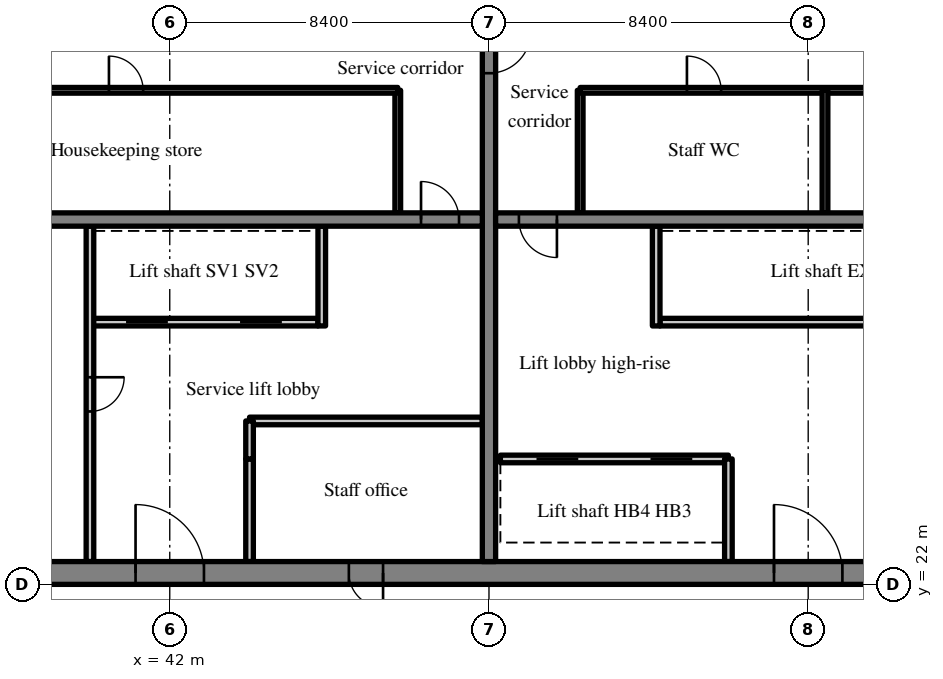
"""IFC4 building model, lengths in metres.
Left out: names, types, materials, properties, quantities, classifications, styles, units other than length and angle.
Written with IfcOpenShell. Run it as: python <this file> out.ifc"""

import sys

from ifc_helpers import new_model, si_unit, direction, frame, frame_2d, origin, place, context, subcontext, project, spatial, rectangle, extrude, source, transform, mapped, element, fill, save


model = new_model("IFC4")
c1 = context("Model", 3, precision=1e-05, world=origin(), true_north=direction((0.0, 1.0)))
c2 = subcontext(c1, "Body", "Model", "MODEL_VIEW")
j1 = project(units=[si_unit("LENGTHUNIT", "METRE"), si_unit("PLANEANGLEUNIT", "RADIAN")], contexts=[c1])
p1 = place(None, origin())
s1 = spatial("IfcSite", under=j1, at=p1, CompositionType="ELEMENT")
p2 = place(p1, origin())
s2 = spatial("IfcBuilding", under=s1, at=p2, CompositionType="ELEMENT")
p3 = place(p2, frame((0.0, 0.0, 249.1)))
s3 = spatial("IfcBuildingStorey", under=s2, at=p3, CompositionType="ELEMENT", Elevation=249.1)
m1 = source(origin(), c2, "Body", "SweptSolid", [
    extrude(rectangle(XDim=50.4, YDim=0.6, at=frame_2d((25.2, 0.0))), origin(), (0.0, 0.0, 1.0), 3.62),
])
p4 = place(p3, frame((25.2, 22.3, 0.0), z_axis=(0.0, 0.0, 1.0), x_axis=(1.0, 0.0, 0.0)))
e1 = element("IfcWall", 1, at=p4, inside=s3, PredefinedType="SHEAR", context=c2, shape_type="MappedRepresentation", body=[
    mapped(m1, transform((0.0, 0.0, 0.0), scale=1.0)),
])
m2 = source(origin(), c2, "Body", "SweptSolid", [
    extrude(rectangle(XDim=1.8, YDim=2.1, at=frame_2d((0.9, 1.05))), frame((0.0, 0.31, 0.0), z_axis=(0.0, -1.0, 0.0), x_axis=(1.0, 0.0, 0.0)), (0.0, 0.0, 1.0), 0.62),
])
p5 = place(p4, frame((15.9, 0.0, 0.0)))
e2 = element("IfcOpeningElement", 2, at=p5, cuts=e1, PredefinedType="OPENING", context=c2, shape_type="MappedRepresentation", body=[
    mapped(m2, transform((0.0, 0.0, 0.0), scale=1.0)),
])
m3 = source(origin(), c2, "Body", "SweptSolid", [
    extrude(rectangle(XDim=0.9, YDim=2.1, at=frame_2d((0.45, 1.05))), frame((0.0, 0.31, 0.0), z_axis=(0.0, -1.0, 0.0), x_axis=(1.0, 0.0, 0.0)), (0.0, 0.0, 1.0), 0.62),
])
p6 = place(p4, frame((21.513, 0.0, 0.0)))
e3 = element("IfcOpeningElement", 3, at=p6, cuts=e1, PredefinedType="OPENING", context=c2, shape_type="MappedRepresentation", body=[
    mapped(m3, transform((0.0, 0.0, 0.0), scale=1.0)),
])
p7 = place(p4, frame((32.7, 0.0, 0.0)))
e4 = element("IfcOpeningElement", 4, at=p7, cuts=e1, PredefinedType="OPENING", context=c2, shape_type="MappedRepresentation", body=[
    mapped(m2, transform((0.0, 0.0, 0.0), scale=1.0)),
])
m4 = source(origin(), c2, "Body", "SweptSolid", [
    extrude(rectangle(XDim=1.2, YDim=2.1, at=frame_2d((0.6, 1.05))), frame((0.0, 0.31, 0.0), z_axis=(0.0, -1.0, 0.0), x_axis=(1.0, 0.0, 0.0)), (0.0, 0.0, 1.0), 0.62),
])
p8 = place(p4, frame((6.488, 0.0, 0.0)))
e5 = element("IfcOpeningElement", 5, at=p8, cuts=e1, PredefinedType="OPENING", context=c2, shape_type="MappedRepresentation", body=[
    mapped(m4, transform((0.0, 0.0, 0.0), scale=1.0)),
])
p9 = place(p4, frame((47.925, 0.0, 0.0)))
e6 = element("IfcOpeningElement", 6, at=p9, cuts=e1, PredefinedType="OPENING", context=c2, shape_type="MappedRepresentation", body=[
    mapped(m4, transform((0.0, 0.0, 0.0), scale=1.0)),
])
m5 = source(origin(), c2, "Body", "SweptSolid", [
    extrude(rectangle(XDim=18.8, YDim=0.35, at=frame_2d((9.4, 0.0))), origin(), (0.0, 0.0, 1.0), 3.62),
])
p10 = place(p3, frame((50.4, 22.6, 0.0), z_axis=(0.0, 0.0, 1.0), x_axis=(0.0, 1.0, 0.0)))
e7 = element("IfcWall", 7, at=p10, inside=s3, PredefinedType="SHEAR", context=c2, shape_type="MappedRepresentation", body=[
    mapped(m5, transform((0.0, 0.0, 0.0), scale=1.0)),
])
m6 = source(origin(), c2, "Body", "SweptSolid", [
    extrude(rectangle(XDim=1.1, YDim=2.1, at=frame_2d((0.55, 1.05))), frame((0.0, 0.185, 0.0), z_axis=(0.0, -1.0, 0.0), x_axis=(1.0, 0.0, 0.0)), (0.0, 0.0, 1.0), 0.37),
])
p11 = place(p10, frame((12.85, 0.0, 0.0)))
e8 = element("IfcOpeningElement", 8, at=p11, cuts=e7, PredefinedType="OPENING", context=c2, shape_type="MappedRepresentation", body=[
    mapped(m6, transform((0.0, 0.0, 0.0), scale=1.0)),
])
m7 = source(origin(), c2, "Body", "SweptSolid", [
    extrude(rectangle(XDim=16.45, YDim=0.35, at=frame_2d((8.225, 0.0))), origin(), (0.0, 0.0, 1.0), 3.62),
])
p12 = place(p3, frame((33.775, 31.6, 0.0), z_axis=(0.0, 0.0, 1.0), x_axis=(1.0, 0.0, 0.0)))
e9 = element("IfcWall", 9, at=p12, inside=s3, PredefinedType="SHEAR", context=c2, shape_type="MappedRepresentation", body=[
    mapped(m7, transform((0.0, 0.0, 0.0), scale=1.0)),
])
m8 = source(origin(), c2, "Body", "SweptSolid", [
    extrude(rectangle(XDim=1.0, YDim=2.1, at=frame_2d((0.5, 1.05))), frame((0.0, 0.185, 0.0), z_axis=(0.0, -1.0, 0.0), x_axis=(1.0, 0.0, 0.0)), (0.0, 0.0, 1.0), 0.37),
])
p13 = place(p12, frame((14.837, 0.0, 0.0)))
e10 = element("IfcOpeningElement", 10, at=p13, cuts=e9, PredefinedType="OPENING", context=c2, shape_type="MappedRepresentation", body=[
    mapped(m8, transform((0.0, 0.0, 0.0), scale=1.0)),
])
m9 = source(origin(), c2, "Body", "SweptSolid", [
    extrude(rectangle(XDim=16.45, YDim=0.35, at=frame_2d((8.225, 0.0))), origin(), (0.0, 0.0, 1.0), 3.62),
])
p14 = place(p3, frame((50.575, 31.6, 0.0), z_axis=(0.0, 0.0, 1.0), x_axis=(1.0, 0.0, 0.0)))
e11 = element("IfcWall", 11, at=p14, inside=s3, PredefinedType="SHEAR", context=c2, shape_type="MappedRepresentation", body=[
    mapped(m9, transform((0.0, 0.0, 0.0), scale=1.0)),
])
p15 = place(p14, frame((0.613, 0.0, 0.0)))
e12 = element("IfcOpeningElement", 12, at=p15, cuts=e11, PredefinedType="OPENING", context=c2, shape_type="MappedRepresentation", body=[
    mapped(m8, transform((0.0, 0.0, 0.0), scale=1.0)),
])
m10 = source(origin(), c2, "Body", "SweptSolid", [
    extrude(rectangle(XDim=6.0, YDim=0.2, at=frame_2d((3.0, 0.0))), origin(), (0.0, 0.0, 1.0), 3.62),
])
p16 = place(p3, frame((39.9, 28.9, 0.0), z_axis=(0.0, 0.0, 1.0), x_axis=(1.0, 0.0, 0.0)))
e13 = element("IfcWall", 13, at=p16, inside=s3, PredefinedType="SOLIDWALL", context=c2, shape_type="MappedRepresentation", body=[
    mapped(m10, transform((0.0, 0.0, 0.0), scale=1.0)),
])
m11 = source(origin(), c2, "Body", "SweptSolid", [
    extrude(rectangle(XDim=1.1, YDim=2.1, at=frame_2d((0.55, 1.05))), frame((0.0, 0.11, 0.0), z_axis=(0.0, -1.0, 0.0), x_axis=(1.0, 0.0, 0.0)), (0.0, 0.0, 1.0), 0.22),
])
p17 = place(p16, frame((0.95, 0.0, 0.0)))
e14 = element("IfcOpeningElement", 14, at=p17, cuts=e13, PredefinedType="OPENING", context=c2, shape_type="MappedRepresentation", body=[
    mapped(m11, transform((0.0, 0.0, 0.0), scale=1.0)),
])
p18 = place(p16, frame((3.95, 0.0, 0.0)))
e15 = element("IfcOpeningElement", 15, at=p18, cuts=e13, PredefinedType="OPENING", context=c2, shape_type="MappedRepresentation", body=[
    mapped(m11, transform((0.0, 0.0, 0.0), scale=1.0)),
])
m12 = source(origin(), c2, "Body", "SweptSolid", [
    extrude(rectangle(XDim=8.825, YDim=0.2, at=frame_2d((4.413, 0.0))), origin(), (0.0, 0.0, 1.0), 3.62),
])
p19 = place(p3, frame((39.9, 22.6, 0.0), z_axis=(0.0, 0.0, 1.0), x_axis=(0.0, 1.0, 0.0)))
e16 = element("IfcWall", 16, at=p19, inside=s3, PredefinedType="PARTITIONING", context=c2, shape_type="MappedRepresentation", body=[
    mapped(m12, transform((0.0, 0.0, 0.0), scale=1.0)),
])
m13 = source(origin(), c2, "Body", "SweptSolid", [
    extrude(rectangle(XDim=0.9, YDim=2.1, at=frame_2d((0.45, 1.05))), frame((0.0, 0.11, 0.0), z_axis=(0.0, -1.0, 0.0), x_axis=(1.0, 0.0, 0.0)), (0.0, 0.0, 1.0), 0.22),
])
p20 = place(p19, frame((3.95, 0.0, 0.0)))
e17 = element("IfcOpeningElement", 17, at=p20, cuts=e16, PredefinedType="OPENING", context=c2, shape_type="MappedRepresentation", body=[
    mapped(m13, transform((0.0, 0.0, 0.0), scale=1.0)),
])
m14 = source(origin(), c2, "Body", "SweptSolid", [
    extrude(rectangle(XDim=2.7, YDim=0.2, at=frame_2d((1.35, 0.0))), origin(), (0.0, 0.0, 1.0), 3.62),
])
p21 = place(p3, frame((44.1, 22.6, 0.0), z_axis=(0.0, 0.0, 1.0), x_axis=(0.0, 1.0, 0.0)))
e18 = element("IfcWall", 18, at=p21, inside=s3, PredefinedType="PARTITIONING", context=c2, shape_type="MappedRepresentation", body=[
    mapped(m14, transform((0.0, 0.0, 0.0), scale=1.0)),
])
m15 = source(origin(), c2, "Body", "SweptSolid", [
    extrude(rectangle(XDim=2.625, YDim=0.2, at=frame_2d((1.312, 0.0))), origin(), (0.0, 0.0, 1.0), 3.62),
])
p22 = place(p3, frame((46.0, 28.8, 0.0), z_axis=(0.0, 0.0, 1.0), x_axis=(0.0, 1.0, 0.0)))
e19 = element("IfcWall", 19, at=p22, inside=s3, PredefinedType="SOLIDWALL", context=c2, shape_type="MappedRepresentation", body=[
    mapped(m15, transform((0.0, 0.0, 0.0), scale=1.0)),
])
m16 = source(origin(), c2, "Body", "SweptSolid", [
    extrude(rectangle(XDim=6.125, YDim=0.2, at=frame_2d((3.062, 0.0))), origin(), (0.0, 0.0, 1.0), 3.62),
])
p23 = place(p3, frame((44.1, 26.3, 0.0), z_axis=(0.0, 0.0, 1.0), x_axis=(1.0, 0.0, 0.0)))
e20 = element("IfcWall", 20, at=p23, inside=s3, PredefinedType="PARTITIONING", context=c2, shape_type="MappedRepresentation", body=[
    mapped(m16, transform((0.0, 0.0, 0.0), scale=1.0)),
])
m17 = source(origin(), c2, "Body", "SweptSolid", [
    extrude(rectangle(XDim=1.0, YDim=0.2, at=frame_2d((0.5, 0.0))), origin(), (0.0, 0.0, 1.0), 3.62),
])
p24 = place(p3, frame((44.1, 25.3, 0.0), z_axis=(0.0, 0.0, 1.0), x_axis=(0.0, 1.0, 0.0)))
e21 = element("IfcWall", 21, at=p24, inside=s3, PredefinedType="PARTITIONING", context=c2, shape_type="MappedRepresentation", body=[
    mapped(m17, transform((0.0, 0.0, 0.0), scale=1.0)),
])
m18 = source(origin(), c2, "Body", "SweptSolid", [
    extrude(rectangle(XDim=3.225, YDim=0.15, at=frame_2d((1.613, 0.0))), origin(), (0.0, 0.0, 1.0), 3.62),
])
p25 = place(p3, frame((48.0, 31.775, 0.0), z_axis=(0.0, 0.0, 1.0), x_axis=(0.0, 1.0, 0.0)))
e22 = element("IfcWall", 22, at=p25, inside=s3, PredefinedType="PARTITIONING", context=c2, shape_type="MappedRepresentation", body=[
    mapped(m18, transform((0.0, 0.0, 0.0), scale=1.0)),
])
m19 = source(origin(), c2, "Body", "SweptSolid", [
    extrude(rectangle(XDim=14.225, YDim=0.15, at=frame_2d((7.113, 0.0))), origin(), (0.0, 0.0, 1.0), 3.62),
])
p26 = place(p3, frame((33.775, 35.0, 0.0), z_axis=(0.0, 0.0, 1.0), x_axis=(1.0, 0.0, 0.0)))
e23 = element("IfcWall", 23, at=p26, inside=s3, PredefinedType="PARTITIONING", context=c2, shape_type="MappedRepresentation", body=[
    mapped(m19, transform((0.0, 0.0, 0.0), scale=1.0)),
])
m20 = source(origin(), c2, "Body", "SweptSolid", [
    extrude(rectangle(XDim=0.9, YDim=2.1, at=frame_2d((0.45, 1.05))), frame((0.0, 0.085, 0.0), z_axis=(0.0, -1.0, 0.0), x_axis=(1.0, 0.0, 0.0)), (0.0, 0.0, 1.0), 0.17),
])
p27 = place(p26, frame((6.625, 0.0, 0.0)))
e24 = element("IfcOpeningElement", 24, at=p27, cuts=e23, PredefinedType="OPENING", context=c2, shape_type="MappedRepresentation", body=[
    mapped(m20, transform((0.0, 0.0, 0.0), scale=1.0)),
])
p28 = place(p3, frame((56.7, 25.3, 0.0), z_axis=(0.0, 0.0, 1.0), x_axis=(-1.0, 0.0, 0.0)))
e25 = element("IfcWall", 25, at=p28, inside=s3, PredefinedType="SOLIDWALL", context=c2, shape_type="MappedRepresentation", body=[
    mapped(m10, transform((0.0, 0.0, 0.0), scale=1.0)),
])
p29 = place(p28, frame((0.95, 0.0, 0.0)))
e26 = element("IfcOpeningElement", 26, at=p29, cuts=e25, PredefinedType="OPENING", context=c2, shape_type="MappedRepresentation", body=[
    mapped(m11, transform((0.0, 0.0, 0.0), scale=1.0)),
])
p30 = place(p28, frame((3.95, 0.0, 0.0)))
e27 = element("IfcOpeningElement", 27, at=p30, cuts=e25, PredefinedType="OPENING", context=c2, shape_type="MappedRepresentation", body=[
    mapped(m11, transform((0.0, 0.0, 0.0), scale=1.0)),
])
m21 = source(origin(), c2, "Body", "SweptSolid", [
    extrude(rectangle(XDim=12.125, YDim=0.2, at=frame_2d((6.062, 0.0))), origin(), (0.0, 0.0, 1.0), 3.62),
])
p31 = place(p3, frame((67.025, 28.9, 0.0), z_axis=(0.0, 0.0, 1.0), x_axis=(-1.0, 0.0, 0.0)))
e28 = element("IfcWall", 28, at=p31, inside=s3, PredefinedType="SOLIDWALL", context=c2, shape_type="MappedRepresentation", body=[
    mapped(m21, transform((0.0, 0.0, 0.0), scale=1.0)),
])
p32 = place(p31, frame((1.075, 0.0, 0.0)))
e29 = element("IfcOpeningElement", 29, at=p32, cuts=e28, PredefinedType="OPENING", context=c2, shape_type="MappedRepresentation", body=[
    mapped(m11, transform((0.0, 0.0, 0.0), scale=1.0)),
])
p33 = place(p31, frame((4.075, 0.0, 0.0)))
e30 = element("IfcOpeningElement", 30, at=p33, cuts=e28, PredefinedType="OPENING", context=c2, shape_type="MappedRepresentation", body=[
    mapped(m11, transform((0.0, 0.0, 0.0), scale=1.0)),
])
p34 = place(p3, frame((56.7, 22.6, 0.0), z_axis=(0.0, 0.0, 1.0), x_axis=(0.0, 1.0, 0.0)))
e31 = element("IfcWall", 31, at=p34, inside=s3, PredefinedType="SOLIDWALL", context=c2, shape_type="MappedRepresentation", body=[
    mapped(m14, transform((0.0, 0.0, 0.0), scale=1.0)),
])
p35 = place(p3, frame((54.8, 28.8, 0.0), z_axis=(0.0, 0.0, 1.0), x_axis=(0.0, 1.0, 0.0)))
e32 = element("IfcWall", 32, at=p35, inside=s3, PredefinedType="SOLIDWALL", context=c2, shape_type="MappedRepresentation", body=[
    mapped(m15, transform((0.0, 0.0, 0.0), scale=1.0)),
])
p36 = place(p3, frame((52.8, 31.775, 0.0), z_axis=(0.0, 0.0, 1.0), x_axis=(0.0, 1.0, 0.0)))
e33 = element("IfcWall", 33, at=p36, inside=s3, PredefinedType="PARTITIONING", context=c2, shape_type="MappedRepresentation", body=[
    mapped(m18, transform((0.0, 0.0, 0.0), scale=1.0)),
])
m22 = source(origin(), c2, "Body", "SweptSolid", [
    extrude(rectangle(XDim=14.225, YDim=0.15, at=frame_2d((7.112, 0.0))), origin(), (0.0, 0.0, 1.0), 3.62),
])
p37 = place(p3, frame((67.025, 35.0, 0.0), z_axis=(0.0, 0.0, 1.0), x_axis=(-1.0, 0.0, 0.0)))
e34 = element("IfcWall", 34, at=p37, inside=s3, PredefinedType="PARTITIONING", context=c2, shape_type="MappedRepresentation", body=[
    mapped(m22, transform((0.0, 0.0, 0.0), scale=1.0)),
])
p38 = place(p37, frame((3.441, 0.0, 0.0)))
e35 = element("IfcOpeningElement", 35, at=p38, cuts=e34, PredefinedType="OPENING", context=c2, shape_type="MappedRepresentation", body=[
    mapped(m20, transform((0.0, 0.0, 0.0), scale=1.0)),
])
p39 = place(p37, frame((10.516, 0.0, 0.0)))
e36 = element("IfcOpeningElement", 36, at=p39, cuts=e34, PredefinedType="OPENING", context=c2, shape_type="MappedRepresentation", body=[
    mapped(m20, transform((0.0, 0.0, 0.0), scale=1.0)),
])
p40 = place(p3, frame((59.242, 31.775, 0.0), z_axis=(0.0, 0.0, 1.0), x_axis=(0.0, 1.0, 0.0)))
e37 = element("IfcWall", 37, at=p40, inside=s3, PredefinedType="PARTITIONING", context=c2, shape_type="MappedRepresentation", body=[
    mapped(m18, transform((0.0, 0.0, 0.0), scale=1.0)),
])
m23 = source(origin(), c2, "Body", "SweptSolid", [
    extrude(rectangle(XDim=1.8, YDim=2.1, at=frame_2d((0.9, 1.05))), frame((0.0, 0.225, 0.0), z_axis=(0.0, -1.0, 0.0), x_axis=(1.0, 0.0, 0.0)), (0.0, 0.0, 1.0), 0.05),
])
p41 = place(p5, origin())
e38 = element("IfcDoor", 38, at=p41, inside=s3, OperationType="DOUBLE_DOOR_SINGLE_SWING", PredefinedType="DOOR", context=c2, shape_type="MappedRepresentation", body=[
    mapped(m23, transform((0.0, 0.0, 0.0), scale=1.0)),
])
fill(e2, e38)
m24 = source(origin(), c2, "Body", "SweptSolid", [
    extrude(rectangle(XDim=1.0, YDim=2.1, at=frame_2d((0.5, 1.05))), frame((0.0, 0.025, 0.0), z_axis=(0.0, -1.0, 0.0), x_axis=(1.0, 0.0, 0.0)), (0.0, 0.0, 1.0), 0.05),
])
p42 = place(p13, origin())
e39 = element("IfcDoor", 39, at=p42, inside=s3, OperationType="SINGLE_SWING_LEFT", PredefinedType="DOOR", context=c2, shape_type="MappedRepresentation", body=[
    mapped(m24, transform((0.0, 0.0, 0.0), scale=1.0)),
])
fill(e10, e39)
m25 = source(origin(), c2, "Body", "SweptSolid", [
    extrude(rectangle(XDim=1.1, YDim=2.1, at=frame_2d((0.55, 1.05))), frame((0.0, 0.025, 0.0), z_axis=(0.0, -1.0, 0.0), x_axis=(1.0, 0.0, 0.0)), (0.0, 0.0, 1.0), 0.05),
])
p43 = place(p17, origin())
e40 = element("IfcDoor", 40, at=p43, inside=s3, OperationType="SLIDING_TO_LEFT", PredefinedType="DOOR", context=c2, shape_type="MappedRepresentation", body=[
    mapped(m25, transform((0.0, 0.0, 0.0), scale=1.0)),
])
fill(e14, e40)
p44 = place(p18, origin())
e41 = element("IfcDoor", 41, at=p44, inside=s3, OperationType="SLIDING_TO_RIGHT", PredefinedType="DOOR", context=c2, shape_type="MappedRepresentation", body=[
    mapped(m25, transform((0.0, 0.0, 0.0), scale=1.0)),
])
fill(e15, e41)
m26 = source(origin(), c2, "Body", "SweptSolid", [
    extrude(rectangle(XDim=0.9, YDim=2.1, at=frame_2d((0.45, 1.05))), frame((0.0, 0.025, 0.0), z_axis=(0.0, -1.0, 0.0), x_axis=(1.0, 0.0, 0.0)), (0.0, 0.0, 1.0), 0.05),
])
p45 = place(p20, origin())
e42 = element("IfcDoor", 42, at=p45, inside=s3, OperationType="SINGLE_SWING_RIGHT", PredefinedType="DOOR", context=c2, shape_type="MappedRepresentation", body=[
    mapped(m26, transform((0.0, 0.0, 0.0), scale=1.0)),
])
fill(e17, e42)
m27 = source(origin(), c2, "Body", "SweptSolid", [
    extrude(rectangle(XDim=0.9, YDim=2.1, at=frame_2d((0.45, 1.05))), frame((0.0, 0.225, 0.0), z_axis=(0.0, -1.0, 0.0), x_axis=(1.0, 0.0, 0.0)), (0.0, 0.0, 1.0), 0.05),
])
p46 = place(p6, origin())
e43 = element("IfcDoor", 43, at=p46, inside=s3, OperationType="SINGLE_SWING_RIGHT", PredefinedType="DOOR", context=c2, shape_type="MappedRepresentation", body=[
    mapped(m27, transform((0.0, 0.0, 0.0), scale=1.0)),
])
fill(e3, e43)
p47 = place(p27, origin())
e44 = element("IfcDoor", 44, at=p47, inside=s3, OperationType="SINGLE_SWING_LEFT", PredefinedType="DOOR", context=c2, shape_type="MappedRepresentation", body=[
    mapped(m26, transform((0.0, 0.0, 0.0), scale=1.0)),
])
fill(e24, e44)
p48 = place(p7, origin())
e45 = element("IfcDoor", 45, at=p48, inside=s3, OperationType="DOUBLE_DOOR_SINGLE_SWING", PredefinedType="DOOR", context=c2, shape_type="MappedRepresentation", body=[
    mapped(m23, transform((0.0, 0.0, 0.0), scale=1.0)),
])
fill(e4, e45)
p49 = place(p15, origin())
e46 = element("IfcDoor", 46, at=p49, inside=s3, OperationType="SINGLE_SWING_RIGHT", PredefinedType="DOOR", context=c2, shape_type="MappedRepresentation", body=[
    mapped(m24, transform((0.0, 0.0, 0.0), scale=1.0)),
])
fill(e12, e46)
p50 = place(p29, origin())
e47 = element("IfcDoor", 47, at=p50, inside=s3, OperationType="SLIDING_TO_RIGHT", PredefinedType="DOOR", context=c2, shape_type="MappedRepresentation", body=[
    mapped(m25, transform((0.0, 0.0, 0.0), scale=1.0)),
])
fill(e26, e47)
p51 = place(p30, origin())
e48 = element("IfcDoor", 48, at=p51, inside=s3, OperationType="SLIDING_TO_LEFT", PredefinedType="DOOR", context=c2, shape_type="MappedRepresentation", body=[
    mapped(m25, transform((0.0, 0.0, 0.0), scale=1.0)),
])
fill(e27, e48)
p52 = place(p39, origin())
e49 = element("IfcDoor", 49, at=p52, inside=s3, OperationType="SINGLE_SWING_RIGHT", PredefinedType="DOOR", context=c2, shape_type="MappedRepresentation", body=[
    mapped(m26, transform((0.0, 0.0, 0.0), scale=1.0)),
])
fill(e36, e49)
p53 = place(p11, origin())
e50 = element("IfcDoor", 50, at=p53, inside=s3, OperationType="SINGLE_SWING_RIGHT", PredefinedType="DOOR", context=c2, shape_type="MappedRepresentation", body=[
    mapped(m25, transform((0.0, 0.0, 0.0), scale=1.0)),
])
fill(e8, e50)
save(model, sys.argv[1])
